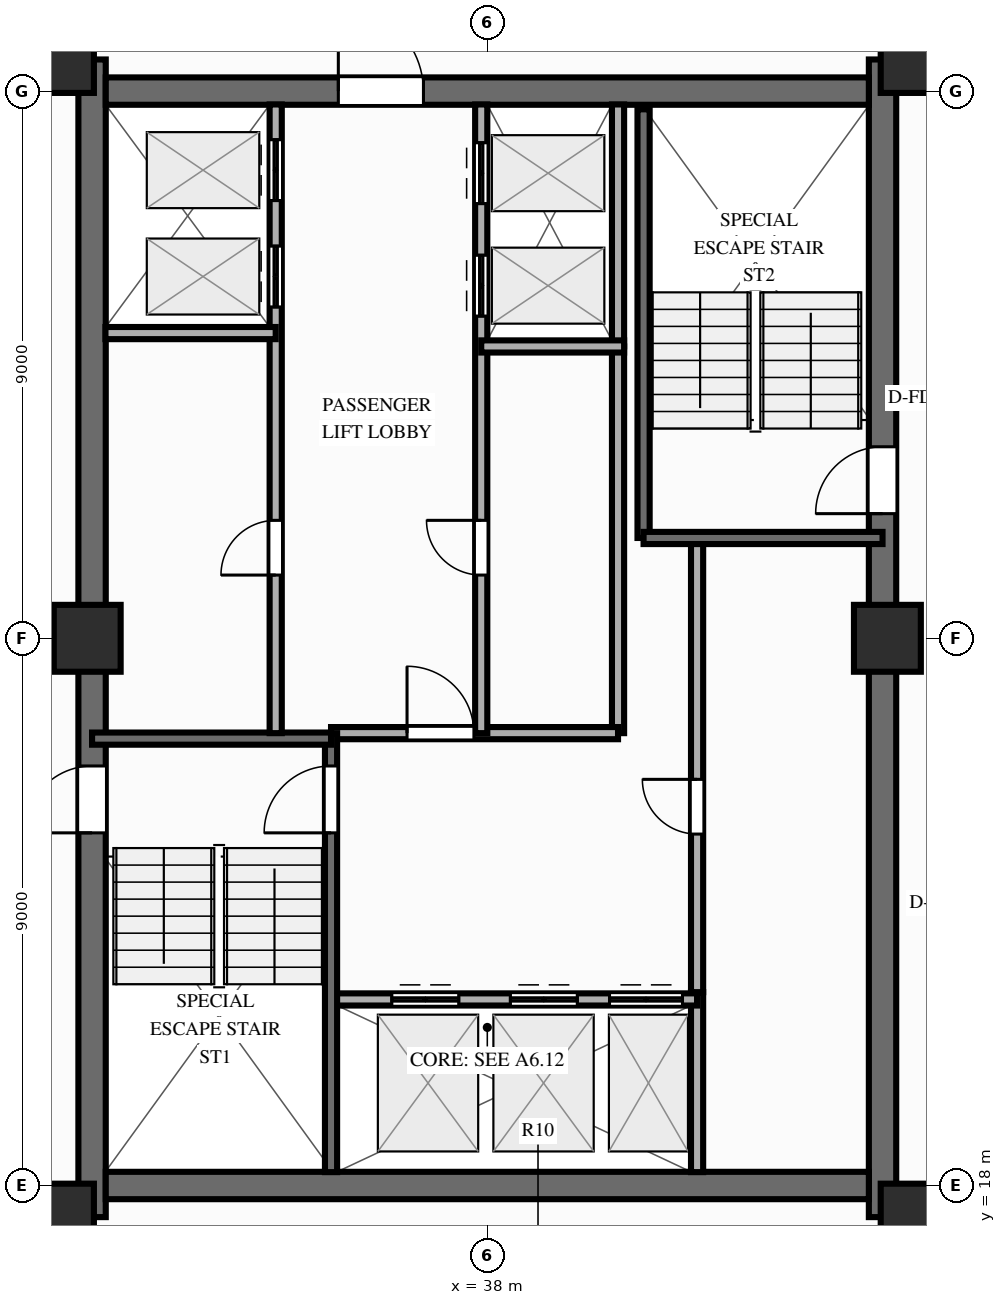
"""IFC4 building model, lengths in metres.
Left out: names, types, materials, properties, quantities, classifications, styles, units other than length and angle.
Written with IfcOpenShell. Run it as: python <this file> out.ifc"""

import sys

from ifc_helpers import new_model, si_unit, direction, frame, frame_2d, origin, origin_2d, place, context, subcontext, project, spatial, rectangle, extrude, source, transform, mapped, element, fill, save


model = new_model("IFC4")
c1 = context("Model", 3, precision=1e-05, world=origin(), true_north=direction((0.0, 1.0)))
c2 = subcontext(c1, "Body", "Model", "MODEL_VIEW")
j1 = project(units=[si_unit("LENGTHUNIT", "METRE"), si_unit("PLANEANGLEUNIT", "RADIAN")], contexts=[c1])
p1 = place(None, origin())
s1 = spatial("IfcSite", under=j1, at=p1, CompositionType="ELEMENT")
p2 = place(p1, origin())
s2 = spatial("IfcBuilding", under=s1, at=p2, CompositionType="ELEMENT")
p3 = place(p2, frame((0.0, 0.0, 189.7)))
s3 = spatial("IfcBuildingStorey", under=s2, at=p3, CompositionType="ELEMENT", Elevation=189.7)
p4 = place(p3, frame((31.5, 17.48, 0.0), z_axis=(0.0, 0.0, 1.0), x_axis=(0.0, 1.0, 0.0)))
e1 = element("IfcWall", 1, at=p4, inside=s3, PredefinedType="SHEAR", context=c2, shape_type="SweptSolid", body=[
    extrude(rectangle(XDim=19.04, YDim=0.45, at=frame_2d((9.52, 0.0))), origin(), (0.0, 0.0, 1.0), 3.0),
])
p5 = place(p4, frame((6.32, 0.0, 0.0)))
e2 = element("IfcOpeningElement", 2, at=p5, cuts=e1, PredefinedType="OPENING", context=c2, shape_type="SweptSolid", body=[
    extrude(rectangle(XDim=1.1, YDim=2.15, at=frame_2d((0.55, 1.075))), frame((0.0, 0.237, 0.0), z_axis=(0.0, -1.0, 0.0), x_axis=(1.0, 0.0, 0.0)), (0.0, 0.0, 1.0), 0.474),
])
p6 = place(p3, frame((44.5, 17.48, 0.0), z_axis=(0.0, 0.0, 1.0), x_axis=(0.0, 1.0, 0.0)))
e3 = element("IfcWall", 3, at=p6, inside=s3, PredefinedType="SHEAR", context=c2, shape_type="SweptSolid", body=[
    extrude(rectangle(XDim=19.04, YDim=0.45, at=frame_2d((9.52, 0.0))), origin(), (0.0, 0.0, 1.0), 3.0),
])
p7 = place(p6, frame((12.67, 0.0, 0.0), z_axis=(0.0, 0.0, 1.0), x_axis=(-1.0, 0.0, 0.0)))
e4 = element("IfcOpeningElement", 4, at=p7, cuts=e3, PredefinedType="OPENING", context=c2, shape_type="SweptSolid", body=[
    extrude(rectangle(XDim=1.1, YDim=2.15, at=frame_2d((0.55, 1.075))), frame((0.0, 0.237, 0.0), z_axis=(0.0, -1.0, 0.0), x_axis=(1.0, 0.0, 0.0)), (0.0, 0.0, 1.0), 0.474),
])
p8 = place(p3, frame((31.725, 18.0, 0.0), z_axis=(0.0, 0.0, 1.0), x_axis=(1.0, 0.0, 0.0)))
e5 = element("IfcWall", 5, at=p8, inside=s3, PredefinedType="SHEAR", context=c2, shape_type="SweptSolid", body=[
    extrude(rectangle(XDim=12.55, YDim=0.45, at=frame_2d((6.275, 0.0))), origin(), (0.0, 0.0, 1.0), 3.0),
])
p9 = place(p3, frame((31.725, 36.0, 0.0), z_axis=(0.0, 0.0, 1.0), x_axis=(1.0, 0.0, 0.0)))
e6 = element("IfcWall", 6, at=p9, inside=s3, PredefinedType="SHEAR", context=c2, shape_type="SweptSolid", body=[
    extrude(rectangle(XDim=12.55, YDim=0.45, at=frame_2d((6.275, 0.0))), origin(), (0.0, 0.0, 1.0), 3.0),
])
p10 = place(p9, frame((5.225, 0.0, 0.0), z_axis=(0.0, 0.0, 1.0), x_axis=(-1.0, 0.0, 0.0)))
e7 = element("IfcOpeningElement", 7, at=p10, cuts=e6, PredefinedType="OPENING", context=c2, shape_type="SweptSolid", body=[
    extrude(rectangle(XDim=1.4, YDim=2.15, at=frame_2d((0.7, 1.075))), frame((0.0, 0.237, 0.0), z_axis=(0.0, -1.0, 0.0), x_axis=(1.0, 0.0, 0.0)), (0.0, 0.0, 1.0), 0.474),
])
m1 = source(origin(), c2, "Body", "SweptSolid", [
    extrude(rectangle(XDim=1.1, YDim=1.1, at=origin_2d()), origin(), (0.0, 0.0, 1.0), 3.0),
])
for number, where, z_axis, x_axis in (
    (8, (30.98, 17.48, 0.0), (0.0, 0.0, 1.0), (1.0, 0.0, 0.0)),
    (9, (45.02, 17.48, 0.0), (0.0, 0.0, 1.0), (1.0, 0.0, 0.0)),
    (10, (30.98, 36.52, 0.0), (0.0, 0.0, 1.0), (1.0, 0.0, 0.0)),
    (11, (45.02, 36.52, 0.0), (0.0, 0.0, 1.0), (1.0, 0.0, 0.0)),
    (12, (31.42, 27.0, 0.0), (0.0, 0.0, 1.0), (1.0, 0.0, 0.0)),
    (13, (44.58, 27.0, 0.0), (0.0, 0.0, 1.0), (1.0, 0.0, 0.0)),
):
    element("IfcColumn", number, at=place(p3, frame(where, z_axis=z_axis, x_axis=x_axis)), inside=s3, PredefinedType="COLUMN", context=c2, shape_type="MappedRepresentation", body=[
        mapped(m1, transform((0.0, 0.0, 0.0), scale=1.0)),
    ])
p11 = place(p3, frame((41.45, 18.22, 0.0), z_axis=(0.0, 0.0, 1.0), x_axis=(0.0, 1.0, 0.0)))
e14 = element("IfcWall", 14, at=p11, inside=s3, PredefinedType="PARTITIONING", context=c2, shape_type="SweptSolid", body=[
    extrude(rectangle(XDim=2.96, YDim=0.2, at=frame_2d((1.48, 0.0))), origin(), (0.0, 0.0, 1.0), 2.79),
])
p12 = place(p3, frame((41.45, 21.18, 0.0), z_axis=(0.0, 0.0, 1.0), x_axis=(0.0, 1.0, 0.0)))
e15 = element("IfcWall", 15, at=p12, inside=s3, PredefinedType="PARTITIONING", context=c2, shape_type="SweptSolid", body=[
    extrude(rectangle(XDim=7.42, YDim=0.2, at=frame_2d((3.71, 0.0))), origin(), (0.0, 0.0, 1.0), 2.79),
])
p13 = place(p12, frame((2.6, 0.0, 0.0)))
e16 = element("IfcOpeningElement", 16, at=p13, cuts=e15, PredefinedType="OPENING", context=c2, shape_type="SweptSolid", body=[
    extrude(rectangle(XDim=0.9, YDim=2.1, at=frame_2d((0.45, 1.05))), frame((0.0, 0.112, 0.0), z_axis=(0.0, -1.0, 0.0), x_axis=(1.0, 0.0, 0.0)), (0.0, 0.0, 1.0), 0.224),
])
p14 = place(p3, frame((40.15, 25.44, 0.0), z_axis=(0.0, 0.0, 1.0), x_axis=(0.0, 1.0, 0.0)))
e17 = element("IfcWall", 17, at=p14, inside=s3, PredefinedType="PARTITIONING", context=c2, shape_type="SweptSolid", body=[
    extrude(rectangle(XDim=6.36, YDim=0.2, at=frame_2d((3.18, 0.0))), origin(), (0.0, 0.0, 1.0), 2.79),
])
p15 = place(p3, frame((40.15, 31.8, 0.0), z_axis=(0.0, 0.0, 1.0), x_axis=(0.0, 1.0, 0.0)))
e18 = element("IfcWall", 18, at=p15, inside=s3, PredefinedType="PARTITIONING", context=c2, shape_type="SweptSolid", body=[
    extrude(rectangle(XDim=3.98, YDim=0.2, at=frame_2d((1.99, 0.0))), origin(), (0.0, 0.0, 1.0), 2.79),
])
p16 = place(p3, frame((35.43, 21.06, 0.0), z_axis=(0.0, 0.0, 1.0), x_axis=(1.0, 0.0, 0.0)))
e19 = element("IfcWall", 19, at=p16, inside=s3, PredefinedType="PARTITIONING", context=c2, shape_type="SweptSolid", body=[
    extrude(rectangle(XDim=6.02, YDim=0.2, at=frame_2d((3.01, 0.0))), origin(), (0.0, 0.0, 1.0), 2.79),
])
p17 = place(p16, frame((1.0, 0.0, 0.0)))
e20 = element("IfcOpeningElement", 20, at=p17, cuts=e19, PredefinedType="OPENING", context=c2, shape_type="SweptSolid", body=[
    extrude(rectangle(XDim=1.1, YDim=2.15, at=frame_2d((0.55, 1.075))), frame((0.0, 0.112, 0.0), z_axis=(0.0, -1.0, 0.0), x_axis=(1.0, 0.0, 0.0)), (0.0, 0.0, 1.0), 0.224),
])
p18 = place(p16, frame((2.95, 0.0, 0.0)))
e21 = element("IfcOpeningElement", 21, at=p18, cuts=e19, PredefinedType="OPENING", context=c2, shape_type="SweptSolid", body=[
    extrude(rectangle(XDim=1.1, YDim=2.15, at=frame_2d((0.55, 1.075))), frame((0.0, 0.112, 0.0), z_axis=(0.0, -1.0, 0.0), x_axis=(1.0, 0.0, 0.0)), (0.0, 0.0, 1.0), 0.224),
])
p19 = place(p16, frame((4.58, 0.0, 0.0)))
e22 = element("IfcOpeningElement", 22, at=p19, cuts=e19, PredefinedType="OPENING", context=c2, shape_type="SweptSolid", body=[
    extrude(rectangle(XDim=1.2, YDim=2.15, at=frame_2d((0.6, 1.075))), frame((0.0, 0.112, 0.0), z_axis=(0.0, -1.0, 0.0), x_axis=(1.0, 0.0, 0.0)), (0.0, 0.0, 1.0), 0.224),
])
p20 = place(p3, frame((35.43, 25.44, 0.0), z_axis=(0.0, 0.0, 1.0), x_axis=(1.0, 0.0, 0.0)))
e23 = element("IfcWall", 23, at=p20, inside=s3, PredefinedType="PARTITIONING", context=c2, shape_type="SweptSolid", body=[
    extrude(rectangle(XDim=4.72, YDim=0.2, at=frame_2d((2.36, 0.0))), origin(), (0.0, 0.0, 1.0), 2.79),
])
p21 = place(p20, frame((1.25, 0.0, 0.0)))
e24 = element("IfcOpeningElement", 24, at=p21, cuts=e23, PredefinedType="OPENING", context=c2, shape_type="SweptSolid", body=[
    extrude(rectangle(XDim=1.1, YDim=2.15, at=frame_2d((0.55, 1.075))), frame((0.0, 0.112, 0.0), z_axis=(0.0, -1.0, 0.0), x_axis=(1.0, 0.0, 0.0)), (0.0, 0.0, 1.0), 0.224),
])
p22 = place(p3, frame((35.43, 18.22, 0.0), z_axis=(0.0, 0.0, 1.0), x_axis=(0.0, 1.0, 0.0)))
e25 = element("IfcWall", 25, at=p22, inside=s3, PredefinedType="SOLIDWALL", context=c2, shape_type="SweptSolid", body=[
    extrude(rectangle(XDim=7.22, YDim=0.2, at=frame_2d((3.61, 0.0))), origin(), (0.0, 0.0, 1.0), 2.79),
])
p23 = place(p22, frame((6.68, 0.0, 0.0), z_axis=(0.0, 0.0, 1.0), x_axis=(-1.0, 0.0, 0.0)))
e26 = element("IfcOpeningElement", 26, at=p23, cuts=e25, PredefinedType="OPENING", context=c2, shape_type="SweptSolid", body=[
    extrude(rectangle(XDim=1.1, YDim=2.15, at=frame_2d((0.55, 1.075))), frame((0.0, 0.112, 0.0), z_axis=(0.0, -1.0, 0.0), x_axis=(1.0, 0.0, 0.0)), (0.0, 0.0, 1.0), 0.224),
])
p24 = place(p3, frame((31.5, 25.35, 0.0), z_axis=(0.0, 0.0, 1.0), x_axis=(1.0, 0.0, 0.0)))
e27 = element("IfcWall", 27, at=p24, inside=s3, PredefinedType="SOLIDWALL", context=c2, shape_type="SweptSolid", body=[
    extrude(rectangle(XDim=3.93, YDim=0.2, at=frame_2d((1.965, 0.0))), origin(), (0.0, 0.0, 1.0), 2.79),
])
p25 = place(p3, frame((40.57, 28.65, 0.0), z_axis=(0.0, 0.0, 1.0), x_axis=(0.0, 1.0, 0.0)))
e28 = element("IfcWall", 28, at=p25, inside=s3, PredefinedType="SOLIDWALL", context=c2, shape_type="SweptSolid", body=[
    extrude(rectangle(XDim=7.05, YDim=0.2, at=frame_2d((3.525, 0.0))), origin(), (0.0, 0.0, 1.0), 2.79),
])
p26 = place(p3, frame((40.57, 28.65, 0.0), z_axis=(0.0, 0.0, 1.0), x_axis=(1.0, 0.0, 0.0)))
e29 = element("IfcWall", 29, at=p26, inside=s3, PredefinedType="SOLIDWALL", context=c2, shape_type="SweptSolid", body=[
    extrude(rectangle(XDim=3.93, YDim=0.2, at=frame_2d((1.965, 0.0))), origin(), (0.0, 0.0, 1.0), 2.79),
])
p27 = place(p3, frame((34.52, 25.44, 0.0), z_axis=(0.0, 0.0, 1.0), x_axis=(0.0, 1.0, 0.0)))
e30 = element("IfcWall", 30, at=p27, inside=s3, PredefinedType="PARTITIONING", context=c2, shape_type="SweptSolid", body=[
    extrude(rectangle(XDim=10.34, YDim=0.2, at=frame_2d((5.17, 0.0))), origin(), (0.0, 0.0, 1.0), 2.79),
])
p28 = place(p27, frame((2.6, 0.0, 0.0)))
e31 = element("IfcOpeningElement", 31, at=p28, cuts=e30, PredefinedType="OPENING", context=c2, shape_type="SweptSolid", body=[
    extrude(rectangle(XDim=0.9, YDim=2.1, at=frame_2d((0.45, 1.05))), frame((0.0, 0.112, 0.0), z_axis=(0.0, -1.0, 0.0), x_axis=(1.0, 0.0, 0.0)), (0.0, 0.0, 1.0), 0.224),
])
p29 = place(p27, frame((7.01, 0.0, 0.0)))
e32 = element("IfcOpeningElement", 32, at=p29, cuts=e30, PredefinedType="OPENING", context=c2, shape_type="SweptSolid", body=[
    extrude(rectangle(XDim=1.0, YDim=2.15, at=frame_2d((0.5, 1.075))), frame((0.0, 0.112, 0.0), z_axis=(0.0, -1.0, 0.0), x_axis=(1.0, 0.0, 0.0)), (0.0, 0.0, 1.0), 0.224),
])
p30 = place(p27, frame((8.76, 0.0, 0.0)))
e33 = element("IfcOpeningElement", 33, at=p30, cuts=e30, PredefinedType="OPENING", context=c2, shape_type="SweptSolid", body=[
    extrude(rectangle(XDim=1.0, YDim=2.15, at=frame_2d((0.5, 1.075))), frame((0.0, 0.112, 0.0), z_axis=(0.0, -1.0, 0.0), x_axis=(1.0, 0.0, 0.0)), (0.0, 0.0, 1.0), 0.224),
])
p31 = place(p3, frame((31.72, 32.02, 0.0), z_axis=(0.0, 0.0, 1.0), x_axis=(1.0, 0.0, 0.0)))
e34 = element("IfcWall", 34, at=p31, inside=s3, PredefinedType="PARTITIONING", context=c2, shape_type="SweptSolid", body=[
    extrude(rectangle(XDim=2.8, YDim=0.2, at=frame_2d((1.4, 0.0))), origin(), (0.0, 0.0, 1.0), 2.79),
])
p32 = place(p3, frame((37.9, 25.44, 0.0), z_axis=(0.0, 0.0, 1.0), x_axis=(0.0, 1.0, 0.0)))
e35 = element("IfcWall", 35, at=p32, inside=s3, PredefinedType="PARTITIONING", context=c2, shape_type="SweptSolid", body=[
    extrude(rectangle(XDim=10.34, YDim=0.2, at=frame_2d((5.17, 0.0))), origin(), (0.0, 0.0, 1.0), 2.79),
])
p33 = place(p32, frame((2.6, 0.0, 0.0)))
e36 = element("IfcOpeningElement", 36, at=p33, cuts=e35, PredefinedType="OPENING", context=c2, shape_type="SweptSolid", body=[
    extrude(rectangle(XDim=0.9, YDim=2.1, at=frame_2d((0.45, 1.05))), frame((0.0, 0.112, 0.0), z_axis=(0.0, -1.0, 0.0), x_axis=(1.0, 0.0, 0.0)), (0.0, 0.0, 1.0), 0.224),
])
p34 = place(p32, frame((6.86, 0.0, 0.0)))
e37 = element("IfcOpeningElement", 37, at=p34, cuts=e35, PredefinedType="OPENING", context=c2, shape_type="SweptSolid", body=[
    extrude(rectangle(XDim=1.0, YDim=2.15, at=frame_2d((0.5, 1.075))), frame((0.0, 0.112, 0.0), z_axis=(0.0, -1.0, 0.0), x_axis=(1.0, 0.0, 0.0)), (0.0, 0.0, 1.0), 0.224),
])
p35 = place(p32, frame((8.71, 0.0, 0.0)))
e38 = element("IfcOpeningElement", 38, at=p35, cuts=e35, PredefinedType="OPENING", context=c2, shape_type="SweptSolid", body=[
    extrude(rectangle(XDim=1.0, YDim=2.15, at=frame_2d((0.5, 1.075))), frame((0.0, 0.112, 0.0), z_axis=(0.0, -1.0, 0.0), x_axis=(1.0, 0.0, 0.0)), (0.0, 0.0, 1.0), 0.224),
])
p36 = place(p3, frame((37.9, 31.8, 0.0), z_axis=(0.0, 0.0, 1.0), x_axis=(1.0, 0.0, 0.0)))
e39 = element("IfcWall", 39, at=p36, inside=s3, PredefinedType="PARTITIONING", context=c2, shape_type="SweptSolid", body=[
    extrude(rectangle(XDim=2.35, YDim=0.2, at=frame_2d((1.175, 0.0))), origin(), (0.0, 0.0, 1.0), 2.79),
])
m2 = source(origin(), c2, "Body", "SweptSolid", [
    extrude(rectangle(XDim=1.1, YDim=2.15, at=frame_2d((0.55, 1.075))), frame((0.0, 0.025, 0.0), z_axis=(0.0, -1.0, 0.0), x_axis=(1.0, 0.0, 0.0)), (0.0, 0.0, 1.0), 0.05),
])
p37 = place(p5, origin())
e40 = element("IfcDoor", 40, at=p37, inside=s3, OperationType="SINGLE_SWING_LEFT", PredefinedType="DOOR", context=c2, shape_type="MappedRepresentation", body=[
    mapped(m2, transform((0.0, 0.0, 0.0), scale=1.0)),
])
fill(e2, e40)
p38 = place(p7, origin())
e41 = element("IfcDoor", 41, at=p38, inside=s3, OperationType="SINGLE_SWING_RIGHT", PredefinedType="DOOR", context=c2, shape_type="MappedRepresentation", body=[
    mapped(m2, transform((0.0, 0.0, 0.0), scale=1.0)),
])
fill(e4, e41)
m3 = source(origin(), c2, "Body", "SweptSolid", [
    extrude(rectangle(XDim=1.4, YDim=2.15, at=frame_2d((0.7, 1.075))), frame((0.0, 0.025, 0.0), z_axis=(0.0, -1.0, 0.0), x_axis=(1.0, 0.0, 0.0)), (0.0, 0.0, 1.0), 0.05),
])
p39 = place(p10, origin())
e42 = element("IfcDoor", 42, at=p39, inside=s3, OperationType="SINGLE_SWING_RIGHT", PredefinedType="DOOR", context=c2, shape_type="MappedRepresentation", body=[
    mapped(m3, transform((0.0, 0.0, 0.0), scale=1.0)),
])
fill(e7, e42)
m4 = source(origin(), c2, "Body", "SweptSolid", [
    extrude(rectangle(XDim=0.9, YDim=2.1, at=frame_2d((0.45, 1.05))), frame((0.0, 0.025, 0.0), z_axis=(0.0, -1.0, 0.0), x_axis=(1.0, 0.0, 0.0)), (0.0, 0.0, 1.0), 0.05),
])
p40 = place(p13, origin())
e43 = element("IfcDoor", 43, at=p40, inside=s3, OperationType="SINGLE_SWING_RIGHT", PredefinedType="DOOR", context=c2, shape_type="MappedRepresentation", body=[
    mapped(m4, transform((0.0, 0.0, 0.0), scale=1.0)),
])
fill(e16, e43)
p41 = place(p17, origin())
e44 = element("IfcDoor", 44, at=p41, inside=s3, OperationType="DOUBLE_DOOR_SLIDING", PredefinedType="DOOR", context=c2, shape_type="MappedRepresentation", body=[
    mapped(m2, transform((0.0, 0.0, 0.0), scale=1.0)),
])
fill(e20, e44)
p42 = place(p18, origin())
e45 = element("IfcDoor", 45, at=p42, inside=s3, OperationType="DOUBLE_DOOR_SLIDING", PredefinedType="DOOR", context=c2, shape_type="MappedRepresentation", body=[
    mapped(m2, transform((0.0, 0.0, 0.0), scale=1.0)),
])
fill(e21, e45)
m5 = source(origin(), c2, "Body", "SweptSolid", [
    extrude(rectangle(XDim=1.2, YDim=2.15, at=frame_2d((0.6, 1.075))), frame((0.0, 0.025, 0.0), z_axis=(0.0, -1.0, 0.0), x_axis=(1.0, 0.0, 0.0)), (0.0, 0.0, 1.0), 0.05),
])
p43 = place(p19, origin())
e46 = element("IfcDoor", 46, at=p43, inside=s3, OperationType="DOUBLE_DOOR_SLIDING", PredefinedType="DOOR", context=c2, shape_type="MappedRepresentation", body=[
    mapped(m5, transform((0.0, 0.0, 0.0), scale=1.0)),
])
fill(e22, e46)
p44 = place(p21, origin())
e47 = element("IfcDoor", 47, at=p44, inside=s3, OperationType="SINGLE_SWING_LEFT", PredefinedType="DOOR", context=c2, shape_type="MappedRepresentation", body=[
    mapped(m2, transform((0.0, 0.0, 0.0), scale=1.0)),
])
fill(e24, e47)
p45 = place(p23, origin())
e48 = element("IfcDoor", 48, at=p45, inside=s3, OperationType="SINGLE_SWING_RIGHT", PredefinedType="DOOR", context=c2, shape_type="MappedRepresentation", body=[
    mapped(m2, transform((0.0, 0.0, 0.0), scale=1.0)),
])
fill(e26, e48)
p46 = place(p28, origin())
e49 = element("IfcDoor", 49, at=p46, inside=s3, OperationType="SINGLE_SWING_LEFT", PredefinedType="DOOR", context=c2, shape_type="MappedRepresentation", body=[
    mapped(m4, transform((0.0, 0.0, 0.0), scale=1.0)),
])
fill(e31, e49)
m6 = source(origin(), c2, "Body", "SweptSolid", [
    extrude(rectangle(XDim=1.0, YDim=2.15, at=frame_2d((0.5, 1.075))), frame((0.0, 0.025, 0.0), z_axis=(0.0, -1.0, 0.0), x_axis=(1.0, 0.0, 0.0)), (0.0, 0.0, 1.0), 0.05),
])
p47 = place(p29, origin())
e50 = element("IfcDoor", 50, at=p47, inside=s3, OperationType="DOUBLE_DOOR_SLIDING", PredefinedType="DOOR", context=c2, shape_type="MappedRepresentation", body=[
    mapped(m6, transform((0.0, 0.0, 0.0), scale=1.0)),
])
fill(e32, e50)
p48 = place(p30, origin())
e51 = element("IfcDoor", 51, at=p48, inside=s3, OperationType="DOUBLE_DOOR_SLIDING", PredefinedType="DOOR", context=c2, shape_type="MappedRepresentation", body=[
    mapped(m6, transform((0.0, 0.0, 0.0), scale=1.0)),
])
fill(e33, e51)
p49 = place(p33, origin())
e52 = element("IfcDoor", 52, at=p49, inside=s3, OperationType="SINGLE_SWING_RIGHT", PredefinedType="DOOR", context=c2, shape_type="MappedRepresentation", body=[
    mapped(m4, transform((0.0, 0.0, 0.0), scale=1.0)),
])
fill(e36, e52)
p50 = place(p34, origin())
e53 = element("IfcDoor", 53, at=p50, inside=s3, OperationType="DOUBLE_DOOR_SLIDING", PredefinedType="DOOR", context=c2, shape_type="MappedRepresentation", body=[
    mapped(m6, transform((0.0, 0.0, 0.0), scale=1.0)),
])
fill(e37, e53)
p51 = place(p35, origin())
e54 = element("IfcDoor", 54, at=p51, inside=s3, OperationType="DOUBLE_DOOR_SLIDING", PredefinedType="DOOR", context=c2, shape_type="MappedRepresentation", body=[
    mapped(m6, transform((0.0, 0.0, 0.0), scale=1.0)),
])
fill(e38, e54)
save(model, sys.argv[1])
